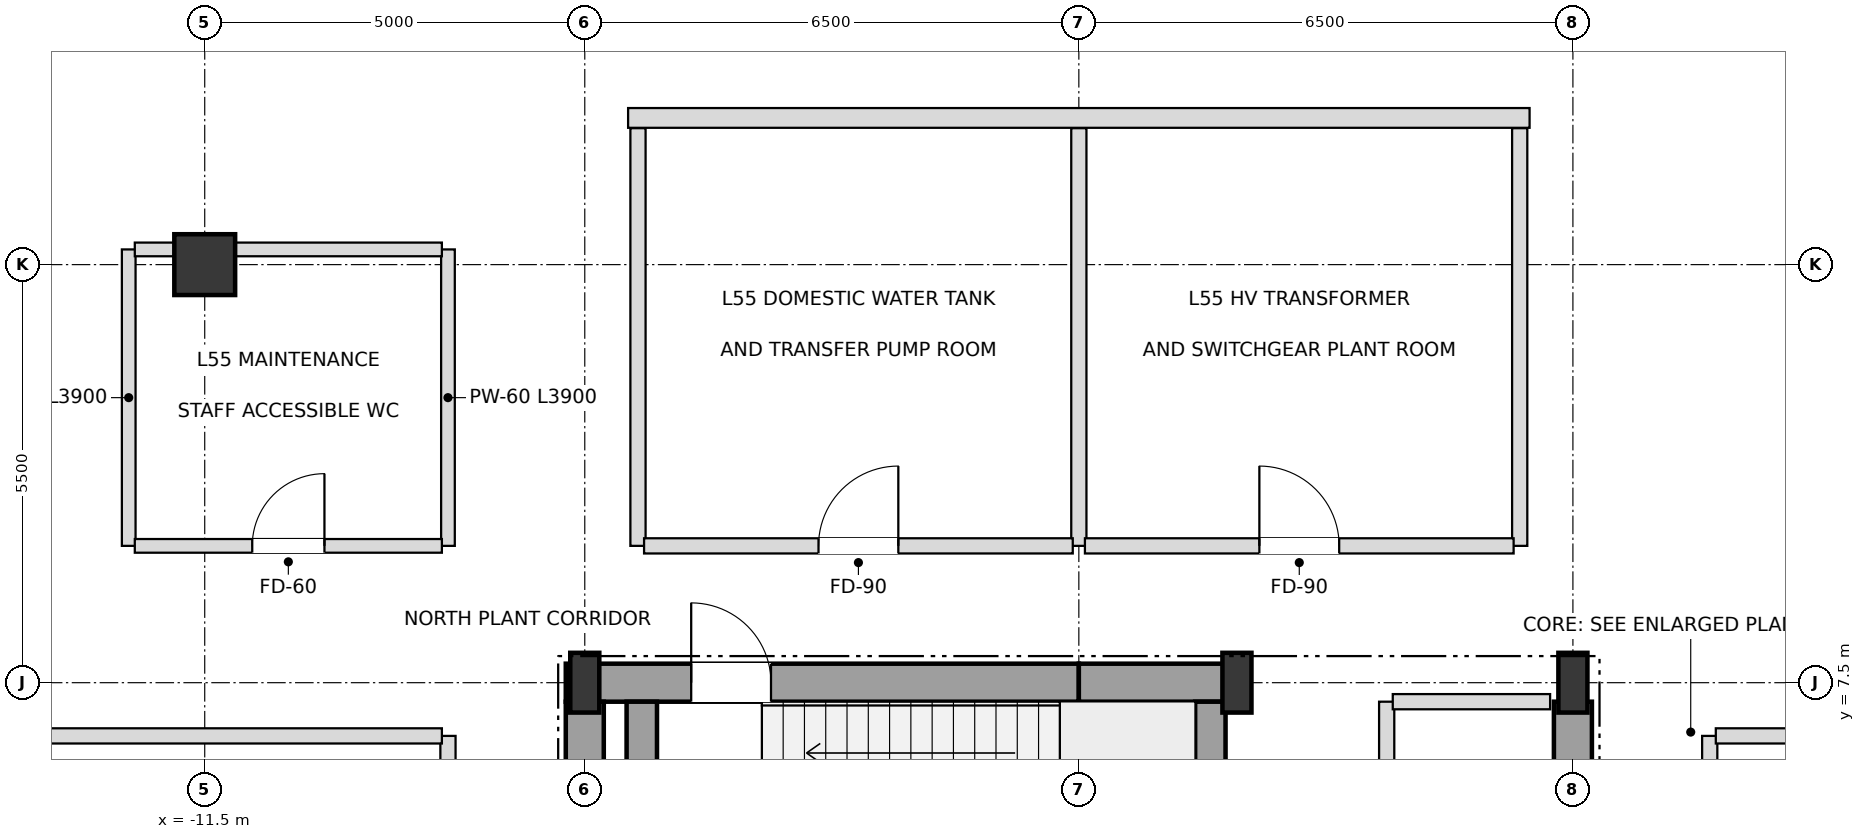
"""IFC4 building model, lengths in metres.
Left out: names, types, materials, properties, quantities, classifications, styles, units other than length and angle.
Written with IfcOpenShell. Run it as: python <this file> out.ifc"""

import sys

from ifc_helpers import new_model, si_unit, direction, frame, frame_2d, origin, origin_2d, place, context, subcontext, project, spatial, rectangle, i_section, extrude, element, fill, save


model = new_model("IFC4")
c1 = context("Model", 3, precision=1e-05, world=origin(), true_north=direction((0.0, 1.0)))
c2 = subcontext(c1, "Body", "Model", "MODEL_VIEW")
j1 = project(units=[si_unit("LENGTHUNIT", "METRE"), si_unit("PLANEANGLEUNIT", "RADIAN")], contexts=[c1])
p1 = place(None, origin())
s1 = spatial("IfcSite", under=j1, at=p1, CompositionType="ELEMENT")
p2 = place(p1, origin())
s2 = spatial("IfcBuilding", under=s1, at=p2, CompositionType="ELEMENT")
p3 = place(p2, frame((0.0, 0.0, 212.4)))
s3 = spatial("IfcBuildingStorey", under=s2, at=p3, CompositionType="ELEMENT", Elevation=212.4)
for number, where, z_axis, x_axis in (
    (1, (-6.5, 7.5, 0.0), (0.0, 0.0, 1.0), (1.0, 0.0, 0.0)),
    (2, (2.08, 7.5, 0.0), (0.0, 0.0, 1.0), (1.0, 0.0, 0.0)),
    (3, (6.5, 7.5, 0.0), (0.0, 0.0, 1.0), (1.0, 0.0, 0.0)),
):
    element("IfcColumn", number, at=place(p3, frame(where, z_axis=z_axis, x_axis=x_axis)), inside=s3, PredefinedType="COLUMN", context=c2, shape_type="SweptSolid", body=[
        extrude(i_section(OverallWidth=0.382, OverallDepth=0.786, WebThickness=0.02, FlangeThickness=0.033, at=origin_2d()), origin(), (0.0, 0.0, 1.0), 5.4),
    ])
p4 = place(p3, frame((-11.5, 13.0, 0.0), z_axis=(0.0, 0.0, 1.0), x_axis=(1.0, 0.0, 0.0)))
e4 = element("IfcColumn", 4, at=p4, inside=s3, PredefinedType="COLUMN", context=c2, shape_type="SweptSolid", body=[
    extrude(rectangle(XDim=0.8, YDim=0.8, at=origin_2d()), origin(), (0.0, 0.0, 1.0), 5.4),
])
p5 = place(p3, frame((-5.93, 14.93, 0.0), z_axis=(0.0, 0.0, 1.0), x_axis=(1.0, 0.0, 0.0)))
e5 = element("IfcWall", 5, at=p5, inside=s3, PredefinedType="SOLIDWALL", context=c2, shape_type="SweptSolid", body=[
    extrude(rectangle(XDim=11.86, YDim=0.26, at=frame_2d((5.93, 0.0))), origin(), (0.0, 0.0, 1.0), 5.1),
])
p6 = place(p3, frame((-6.75, 7.5, 0.0), z_axis=(0.0, 0.0, 1.0), x_axis=(1.0, 0.0, 0.0)))
e6 = element("IfcWall", 6, at=p6, inside=s3, PredefinedType="SHEAR", context=c2, shape_type="SweptSolid", body=[
    extrude(rectangle(XDim=6.75, YDim=0.5, at=frame_2d((3.375, 0.0))), origin(), (0.0, 0.0, 1.0), 5.1),
])
p7 = place(p6, frame((1.65, 0.0, 0.0)))
e7 = element("IfcOpeningElement", 7, at=p7, cuts=e6, PredefinedType="OPENING", context=c2, shape_type="SweptSolid", body=[
    extrude(rectangle(XDim=1.05, YDim=2.15, at=frame_2d((0.525, 1.075))), frame((0.0, 0.26, 0.0), z_axis=(0.0, -1.0, 0.0), x_axis=(1.0, 0.0, 0.0)), (0.0, 0.0, 1.0), 0.52),
])
p8 = place(p3, frame((0.0, 7.5, 0.0), z_axis=(0.0, 0.0, 1.0), x_axis=(1.0, 0.0, 0.0)))
e8 = element("IfcWall", 8, at=p8, inside=s3, PredefinedType="SHEAR", context=c2, shape_type="SweptSolid", body=[
    extrude(rectangle(XDim=2.08, YDim=0.5, at=frame_2d((1.04, 0.0))), origin(), (0.0, 0.0, 1.0), 5.1),
])
for number, where, z_axis, x_axis in (
    (9, (-6.5, 3.95, 0.0), (0.0, 0.0, 1.0), (0.0, 1.0, 0.0)),
    (10, (6.5, 3.95, 0.0), (0.0, 0.0, 1.0), (0.0, 1.0, 0.0)),
):
    element("IfcWall", number, at=place(p3, frame(where, z_axis=z_axis, x_axis=x_axis)), inside=s3, PredefinedType="SHEAR", context=c2, shape_type="SweptSolid", body=[
        extrude(rectangle(XDim=3.3, YDim=0.5, at=frame_2d((1.65, 0.0))), origin(), (0.0, 0.0, 1.0), 5.1),
    ])
for number, where, z_axis, x_axis in (
    (11, (1.73, 3.95, 0.0), (0.0, 0.0, 1.0), (0.0, 1.0, 0.0)),
    (12, (-5.75, 3.95, 0.0), (0.0, 0.0, 1.0), (0.0, 1.0, 0.0)),
):
    element("IfcWall", number, at=place(p3, frame(where, z_axis=z_axis, x_axis=x_axis)), inside=s3, PredefinedType="SHEAR", context=c2, shape_type="SweptSolid", body=[
        extrude(rectangle(XDim=3.3, YDim=0.4, at=frame_2d((1.65, 0.0))), origin(), (0.0, 0.0, 1.0), 5.1),
    ])
p9 = place(p3, frame((-12.5, 9.3, 0.0), z_axis=(0.0, 0.0, 1.0), x_axis=(0.0, 1.0, 0.0)))
e13 = element("IfcWall", 13, at=p9, inside=s3, PredefinedType="PARTITIONING", context=c2, shape_type="SweptSolid", body=[
    extrude(rectangle(XDim=3.9, YDim=0.18, at=frame_2d((1.95, 0.0))), origin(), (0.0, 0.0, 1.0), 3.285),
])
p10 = place(p3, frame((-8.3, -6.8, 0.0), z_axis=(0.0, 0.0, 1.0), x_axis=(0.0, 1.0, 0.0)))
e14 = element("IfcWall", 14, at=p10, inside=s3, PredefinedType="SOLIDWALL", context=c2, shape_type="SweptSolid", body=[
    extrude(rectangle(XDim=13.6, YDim=0.2, at=frame_2d((6.8, 0.0))), origin(), (0.0, 0.0, 1.0), 5.1),
])
p11 = place(p10, frame((6.275, 0.0, 0.0)))
e15 = element("IfcOpeningElement", 15, at=p11, cuts=e14, PredefinedType="OPENING", context=c2, shape_type="SweptSolid", body=[
    extrude(rectangle(XDim=1.05, YDim=2.15, at=frame_2d((0.525, 1.075))), frame((0.0, 0.11, 0.0), z_axis=(0.0, -1.0, 0.0), x_axis=(1.0, 0.0, 0.0)), (0.0, 0.0, 1.0), 0.22),
])
p12 = place(p3, frame((-8.3, 9.3, 0.0), z_axis=(0.0, 0.0, 1.0), x_axis=(0.0, 1.0, 0.0)))
e16 = element("IfcWall", 16, at=p12, inside=s3, PredefinedType="PARTITIONING", context=c2, shape_type="SweptSolid", body=[
    extrude(rectangle(XDim=3.9, YDim=0.18, at=frame_2d((1.95, 0.0))), origin(), (0.0, 0.0, 1.0), 4.153),
])
for number, where, z_axis, x_axis in (
    (17, (-5.8, 9.3, 0.0), (0.0, 0.0, 1.0), (0.0, 1.0, 0.0)),
    (18, (0.0, 9.3, 0.0), (0.0, 0.0, 1.0), (0.0, 1.0, 0.0)),
):
    element("IfcWall", number, at=place(p3, frame(where, z_axis=z_axis, x_axis=x_axis)), inside=s3, PredefinedType="SOLIDWALL", context=c2, shape_type="SweptSolid", body=[
        extrude(rectangle(XDim=5.495, YDim=0.2, at=frame_2d((2.748, 0.0))), origin(), (0.0, 0.0, 1.0), 5.1),
    ])
p13 = place(p3, frame((4.05, 4.2, 0.0), z_axis=(0.0, 0.0, 1.0), x_axis=(0.0, 1.0, 0.0)))
e19 = element("IfcWall", 19, at=p13, inside=s3, PredefinedType="SOLIDWALL", context=c2, shape_type="SweptSolid", body=[
    extrude(rectangle(XDim=3.05, YDim=0.2, at=frame_2d((1.525, 0.0))), origin(), (0.0, 0.0, 1.0), 5.1),
])
p14 = place(p13, frame((0.975, 0.0, 0.0)))
e20 = element("IfcOpeningElement", 20, at=p14, cuts=e19, PredefinedType="OPENING", context=c2, shape_type="SweptSolid", body=[
    extrude(rectangle(XDim=0.95, YDim=2.15, at=frame_2d((0.475, 1.075))), frame((0.0, 0.11, 0.0), z_axis=(0.0, -1.0, 0.0), x_axis=(1.0, 0.0, 0.0)), (0.0, 0.0, 1.0), 0.22),
])
p15 = place(p3, frame((5.8, 9.3, 0.0), z_axis=(0.0, 0.0, 1.0), x_axis=(0.0, 1.0, 0.0)))
e21 = element("IfcWall", 21, at=p15, inside=s3, PredefinedType="SOLIDWALL", context=c2, shape_type="SweptSolid", body=[
    extrude(rectangle(XDim=5.495, YDim=0.2, at=frame_2d((2.748, 0.0))), origin(), (0.0, 0.0, 1.0), 5.1),
])
p16 = place(p3, frame((8.3, -6.8, 0.0), z_axis=(0.0, 0.0, 1.0), x_axis=(0.0, 1.0, 0.0)))
e22 = element("IfcWall", 22, at=p16, inside=s3, PredefinedType="SOLIDWALL", context=c2, shape_type="SweptSolid", body=[
    extrude(rectangle(XDim=13.6, YDim=0.2, at=frame_2d((6.8, 0.0))), origin(), (0.0, 0.0, 1.0), 5.1),
])
p17 = place(p16, frame((6.275, 0.0, 0.0)))
e23 = element("IfcOpeningElement", 23, at=p17, cuts=e22, PredefinedType="OPENING", context=c2, shape_type="SweptSolid", body=[
    extrude(rectangle(XDim=1.05, YDim=2.15, at=frame_2d((0.525, 1.075))), frame((0.0, 0.11, 0.0), z_axis=(0.0, -1.0, 0.0), x_axis=(1.0, 0.0, 0.0)), (0.0, 0.0, 1.0), 0.22),
])
for number, where, z_axis, x_axis in (
    (24, (-16.195, 6.8, 0.0), (0.0, 0.0, 1.0), (1.0, 0.0, 0.0)),
    (25, (8.38, 6.8, 0.0), (0.0, 0.0, 1.0), (1.0, 0.0, 0.0)),
):
    element("IfcWall", number, at=place(p3, frame(where, z_axis=z_axis, x_axis=x_axis)), inside=s3, PredefinedType="SOLIDWALL", context=c2, shape_type="SweptSolid", body=[
        extrude(rectangle(XDim=7.815, YDim=0.2, at=frame_2d((3.908, 0.0))), origin(), (0.0, 0.0, 1.0), 4.738),
    ])
p18 = place(p3, frame((4.13, 7.25, 0.0), z_axis=(0.0, 0.0, 1.0), x_axis=(1.0, 0.0, 0.0)))
e26 = element("IfcWall", 26, at=p18, inside=s3, PredefinedType="SOLIDWALL", context=c2, shape_type="SweptSolid", body=[
    extrude(rectangle(XDim=2.07, YDim=0.2, at=frame_2d((1.035, 0.0))), origin(), (0.0, 0.0, 1.0), 4.153),
])
p19 = place(p3, frame((-12.42, 9.3, 0.0), z_axis=(0.0, 0.0, 1.0), x_axis=(1.0, 0.0, 0.0)))
e27 = element("IfcWall", 27, at=p19, inside=s3, PredefinedType="PARTITIONING", context=c2, shape_type="SweptSolid", body=[
    extrude(rectangle(XDim=4.04, YDim=0.18, at=frame_2d((2.02, 0.0))), origin(), (0.0, 0.0, 1.0), 5.1),
])
p20 = place(p19, frame((1.545, 0.0, 0.0)))
e28 = element("IfcOpeningElement", 28, at=p20, cuts=e27, PredefinedType="OPENING", context=c2, shape_type="SweptSolid", body=[
    extrude(rectangle(XDim=0.95, YDim=2.15, at=frame_2d((0.475, 1.075))), frame((0.0, 0.1, 0.0), z_axis=(0.0, -1.0, 0.0), x_axis=(1.0, 0.0, 0.0)), (0.0, 0.0, 1.0), 0.2),
])
p21 = place(p3, frame((-5.72, 9.3, 0.0), z_axis=(0.0, 0.0, 1.0), x_axis=(1.0, 0.0, 0.0)))
e29 = element("IfcWall", 29, at=p21, inside=s3, PredefinedType="SOLIDWALL", context=c2, shape_type="SweptSolid", body=[
    extrude(rectangle(XDim=5.64, YDim=0.2, at=frame_2d((2.82, 0.0))), origin(), (0.0, 0.0, 1.0), 5.1),
])
p22 = place(p21, frame((2.295, 0.0, 0.0)))
e30 = element("IfcOpeningElement", 30, at=p22, cuts=e29, PredefinedType="OPENING", context=c2, shape_type="SweptSolid", body=[
    extrude(rectangle(XDim=1.05, YDim=2.15, at=frame_2d((0.525, 1.075))), frame((0.0, 0.11, 0.0), z_axis=(0.0, -1.0, 0.0), x_axis=(1.0, 0.0, 0.0)), (0.0, 0.0, 1.0), 0.22),
])
p23 = place(p3, frame((0.08, 9.3, 0.0), z_axis=(0.0, 0.0, 1.0), x_axis=(1.0, 0.0, 0.0)))
e31 = element("IfcWall", 31, at=p23, inside=s3, PredefinedType="SOLIDWALL", context=c2, shape_type="SweptSolid", body=[
    extrude(rectangle(XDim=5.64, YDim=0.2, at=frame_2d((2.82, 0.0))), origin(), (0.0, 0.0, 1.0), 5.1),
])
p24 = place(p23, frame((2.295, 0.0, 0.0)))
e32 = element("IfcOpeningElement", 32, at=p24, cuts=e31, PredefinedType="OPENING", context=c2, shape_type="SweptSolid", body=[
    extrude(rectangle(XDim=1.05, YDim=2.15, at=frame_2d((0.525, 1.075))), frame((0.0, 0.11, 0.0), z_axis=(0.0, -1.0, 0.0), x_axis=(1.0, 0.0, 0.0)), (0.0, 0.0, 1.0), 0.22),
])
p25 = place(p3, frame((-12.42, 13.2, 0.0), z_axis=(0.0, 0.0, 1.0), x_axis=(1.0, 0.0, 0.0)))
e33 = element("IfcWall", 33, at=p25, inside=s3, PredefinedType="PARTITIONING", context=c2, shape_type="SweptSolid", body=[
    extrude(rectangle(XDim=4.04, YDim=0.18, at=frame_2d((2.02, 0.0))), origin(), (0.0, 0.0, 1.0), 3.285),
])
p26 = place(p7, origin())
e34 = element("IfcDoor", 34, at=p26, inside=s3, OperationType="SINGLE_SWING_LEFT", PredefinedType="DOOR", context=c2, shape_type="SweptSolid", body=[
    extrude(rectangle(XDim=1.05, YDim=2.15, at=frame_2d((0.525, 1.075))), frame((0.0, 0.025, 0.0), z_axis=(0.0, -1.0, 0.0), x_axis=(1.0, 0.0, 0.0)), (0.0, 0.0, 1.0), 0.05),
])
fill(e7, e34)
p27 = place(p22, origin())
e35 = element("IfcDoor", 35, at=p27, inside=s3, OperationType="SINGLE_SWING_RIGHT", PredefinedType="DOOR", context=c2, shape_type="SweptSolid", body=[
    extrude(rectangle(XDim=1.05, YDim=2.15, at=frame_2d((0.525, 1.075))), frame((0.0, 0.025, 0.0), z_axis=(0.0, -1.0, 0.0), x_axis=(1.0, 0.0, 0.0)), (0.0, 0.0, 1.0), 0.05),
])
fill(e30, e35)
p28 = place(p24, origin())
e36 = element("IfcDoor", 36, at=p28, inside=s3, OperationType="SINGLE_SWING_LEFT", PredefinedType="DOOR", context=c2, shape_type="SweptSolid", body=[
    extrude(rectangle(XDim=1.05, YDim=2.15, at=frame_2d((0.525, 1.075))), frame((0.0, 0.025, 0.0), z_axis=(0.0, -1.0, 0.0), x_axis=(1.0, 0.0, 0.0)), (0.0, 0.0, 1.0), 0.05),
])
fill(e32, e36)
p29 = place(p20, origin())
e37 = element("IfcDoor", 37, at=p29, inside=s3, OperationType="SINGLE_SWING_RIGHT", PredefinedType="DOOR", context=c2, shape_type="SweptSolid", body=[
    extrude(rectangle(XDim=0.95, YDim=2.15, at=frame_2d((0.475, 1.075))), frame((0.0, 0.025, 0.0), z_axis=(0.0, -1.0, 0.0), x_axis=(1.0, 0.0, 0.0)), (0.0, 0.0, 1.0), 0.05),
])
fill(e28, e37)
save(model, sys.argv[1])
